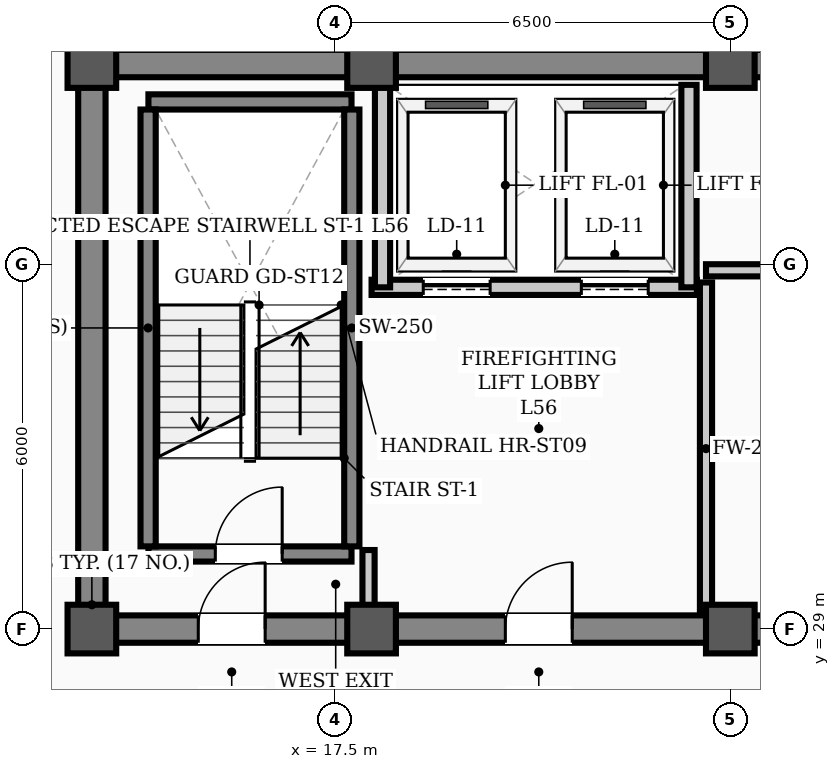
"""IFC4 building model, lengths in metres.
Left out: names, types, materials, properties, quantities, classifications, styles, units other than length and angle.
Written with IfcOpenShell. Run it as: python <this file> out.ifc"""

import sys

from ifc_helpers import new_model, si_unit, direction, frame, frame_2d, origin, origin_2d, place, context, subcontext, project, spatial, rectangle, hollow_rectangle, extrude, element, fill, save


model = new_model("IFC4")
c1 = context("Model", 3, precision=1e-05, world=origin(), true_north=direction((0.0, 1.0)))
c2 = subcontext(c1, "Body", "Model", "MODEL_VIEW")
j1 = project(units=[si_unit("LENGTHUNIT", "METRE"), si_unit("PLANEANGLEUNIT", "RADIAN")], contexts=[c1])
p1 = place(None, origin())
s1 = spatial("IfcSite", under=j1, at=p1, CompositionType="ELEMENT")
p2 = place(p1, origin())
s2 = spatial("IfcBuilding", under=s1, at=p2, CompositionType="ELEMENT")
p3 = place(p2, frame((0.0, 0.0, 226.7)))
s3 = spatial("IfcBuildingStorey", under=s2, at=p3, CompositionType="ELEMENT", Elevation=226.7)
for number, where, z_axis, x_axis in (
    (1, (13.5, 29.0, 0.0), (0.0, 0.0, 1.0), (1.0, 0.0, 0.0)),
    (2, (13.5, 38.3, 0.0), (0.0, 0.0, 1.0), (1.0, 0.0, 0.0)),
    (3, (18.1, 29.0, 0.0), (0.0, 0.0, 1.0), (1.0, 0.0, 0.0)),
    (4, (18.1, 38.3, 0.0), (0.0, 0.0, 1.0), (1.0, 0.0, 0.0)),
    (5, (24.0, 29.0, 0.0), (0.0, 0.0, 1.0), (1.0, 0.0, 0.0)),
    (6, (24.0, 38.3, 0.0), (0.0, 0.0, 1.0), (1.0, 0.0, 0.0)),
):
    element("IfcColumn", number, at=place(p3, frame(where, z_axis=z_axis, x_axis=x_axis)), inside=s3, PredefinedType="COLUMN", context=c2, shape_type="SweptSolid", body=[
        extrude(hollow_rectangle(XDim=0.8, YDim=0.8, WallThickness=0.032, InnerFilletRadius=0.016, OuterFilletRadius=0.048, at=origin_2d()), origin(), (0.0, 0.0, 1.0), 3.9),
    ])
p4 = place(p3, frame((13.5, 29.0, 0.0), z_axis=(0.0, 0.0, 1.0), x_axis=(1.0, 0.0, 0.0)))
e7 = element("IfcWall", 7, at=p4, inside=s3, PredefinedType="SHEAR", context=c2, shape_type="SweptSolid", body=[
    extrude(rectangle(XDim=30.5, YDim=0.45, at=frame_2d((15.25, 0.0))), origin(), (0.0, 0.0, 1.0), 3.66),
])
p5 = place(p4, frame((1.75, 0.0, 0.0)))
e8 = element("IfcOpeningElement", 8, at=p5, cuts=e7, PredefinedType="OPENING", context=c2, shape_type="SweptSolid", body=[
    extrude(rectangle(XDim=1.1, YDim=2.08, at=frame_2d((0.55, 1.04))), frame((0.0, 0.235, 0.0), z_axis=(0.0, -1.0, 0.0), x_axis=(1.0, 0.0, 0.0)), (0.0, 0.0, 1.0), 0.47),
])
p6 = place(p4, frame((26.7, 0.0, 0.0)))
e9 = element("IfcOpeningElement", 9, at=p6, cuts=e7, PredefinedType="OPENING", context=c2, shape_type="SweptSolid", body=[
    extrude(rectangle(XDim=1.1, YDim=2.08, at=frame_2d((0.55, 1.04))), frame((0.0, 0.235, 0.0), z_axis=(0.0, -1.0, 0.0), x_axis=(1.0, 0.0, 0.0)), (0.0, 0.0, 1.0), 0.47),
])
p7 = place(p4, frame((6.8, 0.0, 0.0)))
e10 = element("IfcOpeningElement", 10, at=p7, cuts=e7, PredefinedType="OPENING", context=c2, shape_type="SweptSolid", body=[
    extrude(rectangle(XDim=1.1, YDim=2.08, at=frame_2d((0.55, 1.04))), frame((0.0, 0.235, 0.0), z_axis=(0.0, -1.0, 0.0), x_axis=(1.0, 0.0, 0.0)), (0.0, 0.0, 1.0), 0.47),
])
p8 = place(p4, frame((13.2, 0.0, 0.0)))
e11 = element("IfcOpeningElement", 11, at=p8, cuts=e7, PredefinedType="OPENING", context=c2, shape_type="SweptSolid", body=[
    extrude(rectangle(XDim=1.6, YDim=2.08, at=frame_2d((0.8, 1.04))), frame((0.0, 0.235, 0.0), z_axis=(0.0, -1.0, 0.0), x_axis=(1.0, 0.0, 0.0)), (0.0, 0.0, 1.0), 0.47),
])
p9 = place(p4, frame((19.53, 0.0, 0.0)))
e12 = element("IfcOpeningElement", 12, at=p9, cuts=e7, PredefinedType="OPENING", context=c2, shape_type="SweptSolid", body=[
    extrude(rectangle(XDim=0.9, YDim=2.08, at=frame_2d((0.45, 1.04))), frame((0.0, 0.235, 0.0), z_axis=(0.0, -1.0, 0.0), x_axis=(1.0, 0.0, 0.0)), (0.0, 0.0, 1.0), 0.47),
])
p10 = place(p4, frame((21.57, 0.0, 0.0)))
e13 = element("IfcOpeningElement", 13, at=p10, cuts=e7, PredefinedType="OPENING", context=c2, shape_type="SweptSolid", body=[
    extrude(rectangle(XDim=0.9, YDim=2.08, at=frame_2d((0.45, 1.04))), frame((0.0, 0.235, 0.0), z_axis=(0.0, -1.0, 0.0), x_axis=(1.0, 0.0, 0.0)), (0.0, 0.0, 1.0), 0.47),
])
p11 = place(p3, frame((13.5, 38.3, 0.0), z_axis=(0.0, 0.0, 1.0), x_axis=(1.0, 0.0, 0.0)))
e14 = element("IfcWall", 14, at=p11, inside=s3, PredefinedType="SHEAR", context=c2, shape_type="SweptSolid", body=[
    extrude(rectangle(XDim=30.5, YDim=0.45, at=frame_2d((15.25, 0.0))), origin(), (0.0, 0.0, 1.0), 3.66),
])
p12 = place(p3, frame((13.5, 29.35, 0.0), z_axis=(0.0, 0.0, 1.0), x_axis=(0.0, 1.0, 0.0)))
e15 = element("IfcWall", 15, at=p12, inside=s3, PredefinedType="SHEAR", context=c2, shape_type="SweptSolid", body=[
    extrude(rectangle(XDim=8.6, YDim=0.45, at=frame_2d((4.3, 0.0))), origin(), (0.0, 0.0, 1.0), 3.66),
])
p13 = place(p3, frame((14.43, 30.235, 0.0), z_axis=(0.0, 0.0, 1.0), x_axis=(1.0, 0.0, 0.0)))
e16 = element("IfcWall", 16, at=p13, inside=s3, PredefinedType="STANDARD", context=c2, shape_type="SweptSolid", body=[
    extrude(rectangle(XDim=3.34, YDim=0.25, at=frame_2d((1.67, 0.0))), origin(), (0.0, 0.0, 1.0), 3.66),
])
p14 = place(p13, frame((1.1, 0.0, 0.0)))
e17 = element("IfcOpeningElement", 17, at=p14, cuts=e16, PredefinedType="OPENING", context=c2, shape_type="SweptSolid", body=[
    extrude(rectangle(XDim=1.1, YDim=2.08, at=frame_2d((0.55, 1.04))), frame((0.0, 0.135, 0.0), z_axis=(0.0, -1.0, 0.0), x_axis=(1.0, 0.0, 0.0)), (0.0, 0.0, 1.0), 0.27),
])
p15 = place(p3, frame((14.43, 37.669, 0.0), z_axis=(0.0, 0.0, 1.0), x_axis=(1.0, 0.0, 0.0)))
e18 = element("IfcWall", 18, at=p15, inside=s3, PredefinedType="STANDARD", context=c2, shape_type="SweptSolid", body=[
    extrude(rectangle(XDim=3.34, YDim=0.25, at=frame_2d((1.67, 0.0))), origin(), (0.0, 0.0, 1.0), 3.66),
])
for number, where, z_axis, x_axis in (
    (19, (14.425, 30.36, 0.0), (0.0, 0.0, 1.0), (0.0, 1.0, 0.0)),
    (20, (17.775, 30.36, 0.0), (0.0, 0.0, 1.0), (0.0, 1.0, 0.0)),
):
    element("IfcWall", number, at=place(p3, frame(where, z_axis=z_axis, x_axis=x_axis)), inside=s3, PredefinedType="STANDARD", context=c2, shape_type="SweptSolid", body=[
        extrude(rectangle(XDim=7.184, YDim=0.25, at=frame_2d((3.592, 0.0))), origin(), (0.0, 0.0, 1.0), 3.66),
    ])
p16 = place(p3, frame((18.1, 34.62, 0.0), z_axis=(0.0, 0.0, 1.0), x_axis=(1.0, 0.0, 0.0)))
e21 = element("IfcWall", 21, at=p16, inside=s3, PredefinedType="STANDARD", context=c2, shape_type="SweptSolid", body=[
    extrude(rectangle(XDim=5.35, YDim=0.25, at=frame_2d((2.675, 0.0))), origin(), (0.0, 0.0, 1.0), 3.66),
])
p17 = place(p16, frame((0.85, 0.0, 0.0)))
e22 = element("IfcOpeningElement", 22, at=p17, cuts=e21, PredefinedType="OPENING", context=c2, shape_type="SweptSolid", body=[
    extrude(rectangle(XDim=1.1, YDim=2.08, at=frame_2d((0.55, 1.04))), frame((0.0, 0.135, 0.0), z_axis=(0.0, -1.0, 0.0), x_axis=(1.0, 0.0, 0.0)), (0.0, 0.0, 1.0), 0.27),
])
p18 = place(p16, frame((3.45, 0.0, 0.0)))
e23 = element("IfcOpeningElement", 23, at=p18, cuts=e21, PredefinedType="OPENING", context=c2, shape_type="SweptSolid", body=[
    extrude(rectangle(XDim=1.1, YDim=2.08, at=frame_2d((0.55, 1.04))), frame((0.0, 0.135, 0.0), z_axis=(0.0, -1.0, 0.0), x_axis=(1.0, 0.0, 0.0)), (0.0, 0.0, 1.0), 0.27),
])
for number, where, z_axis, x_axis in (
    (24, (18.28, 34.62, 0.0), (0.0, 0.0, 1.0), (0.0, 1.0, 0.0)),
    (25, (23.32, 34.62, 0.0), (0.0, 0.0, 1.0), (0.0, 1.0, 0.0)),
):
    element("IfcWall", number, at=place(p3, frame(where, z_axis=z_axis, x_axis=x_axis)), inside=s3, PredefinedType="STANDARD", context=c2, shape_type="SweptSolid", body=[
        extrude(rectangle(XDim=3.33, YDim=0.25, at=frame_2d((1.665, 0.0))), origin(), (0.0, 0.0, 1.0), 2.24),
    ])
p19 = place(p3, frame((23.6, 34.9, 0.0), z_axis=(0.0, 0.0, 1.0), x_axis=(1.0, 0.0, 0.0)))
e26 = element("IfcWall", 26, at=p19, inside=s3, PredefinedType="STANDARD", context=c2, shape_type="SweptSolid", body=[
    extrude(rectangle(XDim=8.18, YDim=0.2, at=frame_2d((4.09, 0.0))), origin(), (0.0, 0.0, 1.0), 3.66),
])
p20 = place(p19, frame((3.45, 0.0, 0.0)))
e27 = element("IfcOpeningElement", 27, at=p20, cuts=e26, PredefinedType="OPENING", context=c2, shape_type="SweptSolid", body=[
    extrude(rectangle(XDim=1.1, YDim=2.08, at=frame_2d((0.55, 1.04))), frame((0.0, 0.11, 0.0), z_axis=(0.0, -1.0, 0.0), x_axis=(1.0, 0.0, 0.0)), (0.0, 0.0, 1.0), 0.22),
])
p21 = place(p3, frame((18.05, 29.235, 0.0), z_axis=(0.0, 0.0, 1.0), x_axis=(0.0, 1.0, 0.0)))
e28 = element("IfcWall", 28, at=p21, inside=s3, PredefinedType="STANDARD", context=c2, shape_type="SweptSolid", body=[
    extrude(rectangle(XDim=1.065, YDim=0.2, at=frame_2d((0.532, 0.0))), origin(), (0.0, 0.0, 1.0), 2.24),
])
p22 = place(p3, frame((23.6, 29.235, 0.0), z_axis=(0.0, 0.0, 1.0), x_axis=(0.0, 1.0, 0.0)))
e29 = element("IfcWall", 29, at=p22, inside=s3, PredefinedType="STANDARD", context=c2, shape_type="SweptSolid", body=[
    extrude(rectangle(XDim=5.465, YDim=0.2, at=frame_2d((2.732, 0.0))), origin(), (0.0, 0.0, 1.0), 2.24),
])
p23 = place(p14, origin())
e30 = element("IfcDoor", 30, at=p23, inside=s3, OperationType="SINGLE_SWING_RIGHT", PredefinedType="DOOR", context=c2, shape_type="SweptSolid", body=[
    extrude(rectangle(XDim=1.1, YDim=2.08, at=frame_2d((0.55, 1.04))), frame((0.0, 0.025, 0.0), z_axis=(0.0, -1.0, 0.0), x_axis=(1.0, 0.0, 0.0)), (0.0, 0.0, 1.0), 0.05),
])
fill(e17, e30)
p24 = place(p5, origin())
e31 = element("IfcDoor", 31, at=p24, inside=s3, OperationType="SINGLE_SWING_RIGHT", PredefinedType="DOOR", context=c2, shape_type="SweptSolid", body=[
    extrude(rectangle(XDim=1.1, YDim=2.08, at=frame_2d((0.55, 1.04))), frame((0.0, 0.025, 0.0), z_axis=(0.0, -1.0, 0.0), x_axis=(1.0, 0.0, 0.0)), (0.0, 0.0, 1.0), 0.05),
])
fill(e8, e31)
p25 = place(p7, origin())
e32 = element("IfcDoor", 32, at=p25, inside=s3, OperationType="SINGLE_SWING_RIGHT", PredefinedType="DOOR", context=c2, shape_type="SweptSolid", body=[
    extrude(rectangle(XDim=1.1, YDim=2.08, at=frame_2d((0.55, 1.04))), frame((0.0, 0.025, 0.0), z_axis=(0.0, -1.0, 0.0), x_axis=(1.0, 0.0, 0.0)), (0.0, 0.0, 1.0), 0.05),
])
fill(e10, e32)
p26 = place(p17, origin())
e33 = element("IfcDoor", 33, at=p26, inside=s3, OperationType="SLIDING_TO_LEFT", PredefinedType="DOOR", context=c2, shape_type="SweptSolid", body=[
    extrude(rectangle(XDim=1.1, YDim=2.08, at=frame_2d((0.55, 1.04))), frame((0.0, 0.025, 0.0), z_axis=(0.0, -1.0, 0.0), x_axis=(1.0, 0.0, 0.0)), (0.0, 0.0, 1.0), 0.05),
])
fill(e22, e33)
p27 = place(p18, origin())
e34 = element("IfcDoor", 34, at=p27, inside=s3, OperationType="SLIDING_TO_LEFT", PredefinedType="DOOR", context=c2, shape_type="SweptSolid", body=[
    extrude(rectangle(XDim=1.1, YDim=2.08, at=frame_2d((0.55, 1.04))), frame((0.0, 0.025, 0.0), z_axis=(0.0, -1.0, 0.0), x_axis=(1.0, 0.0, 0.0)), (0.0, 0.0, 1.0), 0.05),
])
fill(e23, e34)
save(model, sys.argv[1])
